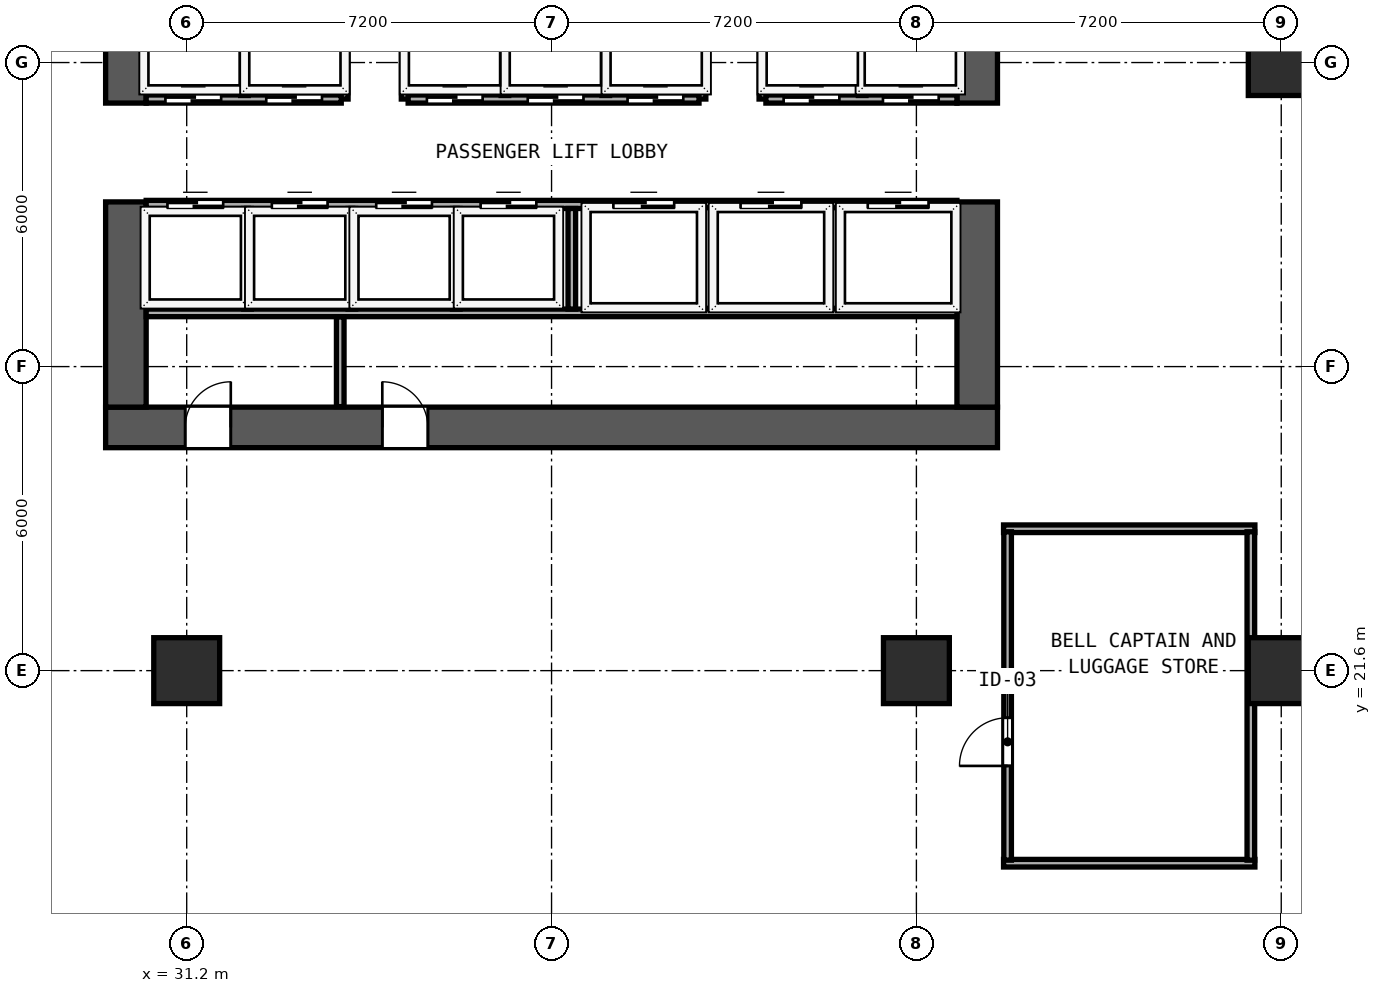
"""IFC4 building model, lengths in metres.
Left out: names, types, materials, properties, quantities, classifications, styles, units other than length and angle.
Written with IfcOpenShell. Run it as: python <this file> out.ifc"""

import sys

from ifc_helpers import new_model, si_unit, direction, frame, frame_2d, origin, origin_2d, place, context, subcontext, project, spatial, rectangle, hollow_rectangle, extrude, element, fill, save


model = new_model("IFC4")
c1 = context("Model", 3, precision=1e-05, world=origin(), true_north=direction((0.0, 1.0)))
c2 = subcontext(c1, "Body", "Model", "MODEL_VIEW")
j1 = project(units=[si_unit("LENGTHUNIT", "METRE"), si_unit("PLANEANGLEUNIT", "RADIAN")], contexts=[c1])
p1 = place(None, origin())
s1 = spatial("IfcSite", under=j1, at=p1, CompositionType="ELEMENT")
p2 = place(p1, origin())
s2 = spatial("IfcBuilding", under=s1, at=p2, CompositionType="ELEMENT")
p3 = place(p2, origin())
s3 = spatial("IfcBuildingStorey", under=s2, at=p3, CompositionType="ELEMENT", Elevation=0.0)
p4 = place(p3, frame((29.6, 26.4, 0.0), z_axis=(0.0, 0.0, 1.0), x_axis=(1.0, 0.0, 0.0)))
e1 = element("IfcWall", 1, at=p4, inside=s3, PredefinedType="SHEAR", context=c2, shape_type="SweptSolid", body=[
    extrude(rectangle(XDim=17.6, YDim=0.8, at=frame_2d((8.8, 0.0))), origin(), (0.0, 0.0, 1.0), 5.16),
])
p5 = place(p4, frame((2.47, 0.0, 0.0), z_axis=(0.0, 0.0, 1.0), x_axis=(-1.0, 0.0, 0.0)))
e2 = element("IfcOpeningElement", 2, at=p5, cuts=e1, PredefinedType="OPENING", context=c2, shape_type="SweptSolid", body=[
    extrude(rectangle(XDim=0.9, YDim=2.1, at=frame_2d((0.45, 1.05))), frame((0.0, 0.41, 0.0), z_axis=(0.0, -1.0, 0.0), x_axis=(1.0, 0.0, 0.0)), (0.0, 0.0, 1.0), 0.82),
])
p6 = place(p4, frame((6.36, 0.0, 0.0), z_axis=(0.0, 0.0, 1.0), x_axis=(-1.0, 0.0, 0.0)))
e3 = element("IfcOpeningElement", 3, at=p6, cuts=e1, PredefinedType="OPENING", context=c2, shape_type="SweptSolid", body=[
    extrude(rectangle(XDim=0.9, YDim=2.1, at=frame_2d((0.45, 1.05))), frame((0.0, 0.41, 0.0), z_axis=(0.0, -1.0, 0.0), x_axis=(1.0, 0.0, 0.0)), (0.0, 0.0, 1.0), 0.82),
])
p7 = place(p3, frame((30.0, 26.8, 0.0), z_axis=(0.0, 0.0, 1.0), x_axis=(0.0, 1.0, 0.0)))
e4 = element("IfcWall", 4, at=p7, inside=s3, PredefinedType="SHEAR", context=c2, shape_type="SweptSolid", body=[
    extrude(rectangle(XDim=4.05, YDim=0.8, at=frame_2d((2.025, 0.0))), origin(), (0.0, 0.0, 1.0), 5.16),
])
p8 = place(p3, frame((30.0, 32.8, 0.0), z_axis=(0.0, 0.0, 1.0), x_axis=(0.0, 1.0, 0.0)))
e5 = element("IfcWall", 5, at=p8, inside=s3, PredefinedType="SHEAR", context=c2, shape_type="SweptSolid", body=[
    extrude(rectangle(XDim=10.0, YDim=0.8, at=frame_2d((5.0, 0.0))), origin(), (0.0, 0.0, 1.0), 5.16),
])
p9 = place(p3, frame((46.8, 26.8, 0.0), z_axis=(0.0, 0.0, 1.0), x_axis=(0.0, 1.0, 0.0)))
e6 = element("IfcWall", 6, at=p9, inside=s3, PredefinedType="SHEAR", context=c2, shape_type="SweptSolid", body=[
    extrude(rectangle(XDim=4.05, YDim=0.8, at=frame_2d((2.025, 0.0))), origin(), (0.0, 0.0, 1.0), 5.16),
])
p10 = place(p3, frame((46.8, 32.8, 0.0), z_axis=(0.0, 0.0, 1.0), x_axis=(0.0, 1.0, 0.0)))
e7 = element("IfcWall", 7, at=p10, inside=s3, PredefinedType="SHEAR", context=c2, shape_type="SweptSolid", body=[
    extrude(rectangle(XDim=10.0, YDim=0.8, at=frame_2d((5.0, 0.0))), origin(), (0.0, 0.0, 1.0), 5.16),
])
for number, where, z_axis, x_axis in (
    (8, (52.8, 21.6, 0.0), (0.0, 0.0, 1.0), (1.0, 0.0, 0.0)),
    (9, (52.8, 33.6, 0.0), (0.0, 0.0, 1.0), (1.0, 0.0, 0.0)),
    (10, (31.2, 21.6, 0.0), (0.0, 0.0, 1.0), (1.0, 0.0, 0.0)),
    (11, (45.6, 21.6, 0.0), (0.0, 0.0, 1.0), (1.0, 0.0, 0.0)),
):
    element("IfcColumn", number, at=place(p3, frame(where, z_axis=z_axis, x_axis=x_axis)), inside=s3, PredefinedType="COLUMN", context=c2, shape_type="SweptSolid", body=[
        extrude(hollow_rectangle(XDim=1.3, YDim=1.3, WallThickness=0.048, at=origin_2d()), origin(), (0.0, 0.0, 1.0), 5.4),
    ])
for number, where, z_axis, x_axis in (
    (12, (34.31, 32.88, 0.0), (0.0, 0.0, 1.0), (0.0, 1.0, 0.0)),
    (13, (35.51, 32.88, 0.0), (0.0, 0.0, 1.0), (0.0, 1.0, 0.0)),
    (14, (41.37, 32.88, 0.0), (0.0, 0.0, 1.0), (0.0, 1.0, 0.0)),
    (15, (42.57, 32.88, 0.0), (0.0, 0.0, 1.0), (0.0, 1.0, 0.0)),
):
    element("IfcWall", number, at=place(p3, frame(where, z_axis=z_axis, x_axis=x_axis)), inside=s3, PredefinedType="SOLIDWALL", context=c2, shape_type="SweptSolid", body=[
        extrude(rectangle(XDim=2.17, YDim=0.15, at=frame_2d((1.085, 0.0))), origin(), (0.0, 0.0, 1.0), 5.16),
    ])
p11 = place(p3, frame((30.4, 32.88, 0.0), z_axis=(0.0, 0.0, 1.0), x_axis=(1.0, 0.0, 0.0)))
e16 = element("IfcWall", 16, at=p11, inside=s3, PredefinedType="SOLIDWALL", context=c2, shape_type="SweptSolid", body=[
    extrude(rectangle(XDim=3.85, YDim=0.16, at=frame_2d((1.925, 0.0))), origin(), (0.0, 0.0, 1.0), 5.16),
])
p12 = place(p11, frame((1.48, 0.0, 0.0), z_axis=(0.0, 0.0, 1.0), x_axis=(-1.0, 0.0, 0.0)))
e17 = element("IfcOpeningElement", 17, at=p12, cuts=e16, PredefinedType="OPENING", context=c2, shape_type="SweptSolid", body=[
    extrude(rectangle(XDim=1.1, YDim=2.2, at=frame_2d((0.55, 1.1))), frame((0.0, 0.09, 0.0), z_axis=(0.0, -1.0, 0.0), x_axis=(1.0, 0.0, 0.0)), (0.0, 0.0, 1.0), 0.18),
])
p13 = place(p11, frame((3.47, 0.0, 0.0), z_axis=(0.0, 0.0, 1.0), x_axis=(-1.0, 0.0, 0.0)))
e18 = element("IfcOpeningElement", 18, at=p13, cuts=e16, PredefinedType="OPENING", context=c2, shape_type="SweptSolid", body=[
    extrude(rectangle(XDim=1.1, YDim=2.2, at=frame_2d((0.55, 1.1))), frame((0.0, 0.09, 0.0), z_axis=(0.0, -1.0, 0.0), x_axis=(1.0, 0.0, 0.0)), (0.0, 0.0, 1.0), 0.18),
])
p14 = place(p3, frame((35.57, 32.88, 0.0), z_axis=(0.0, 0.0, 1.0), x_axis=(1.0, 0.0, 0.0)))
e19 = element("IfcWall", 19, at=p14, inside=s3, PredefinedType="SOLIDWALL", context=c2, shape_type="SweptSolid", body=[
    extrude(rectangle(XDim=5.74, YDim=0.16, at=frame_2d((2.87, 0.0))), origin(), (0.0, 0.0, 1.0), 5.16),
])
p15 = place(p14, frame((1.47, 0.0, 0.0), z_axis=(0.0, 0.0, 1.0), x_axis=(-1.0, 0.0, 0.0)))
e20 = element("IfcOpeningElement", 20, at=p15, cuts=e19, PredefinedType="OPENING", context=c2, shape_type="SweptSolid", body=[
    extrude(rectangle(XDim=1.1, YDim=2.2, at=frame_2d((0.55, 1.1))), frame((0.0, 0.09, 0.0), z_axis=(0.0, -1.0, 0.0), x_axis=(1.0, 0.0, 0.0)), (0.0, 0.0, 1.0), 0.18),
])
p16 = place(p14, frame((3.46, 0.0, 0.0), z_axis=(0.0, 0.0, 1.0), x_axis=(-1.0, 0.0, 0.0)))
e21 = element("IfcOpeningElement", 21, at=p16, cuts=e19, PredefinedType="OPENING", context=c2, shape_type="SweptSolid", body=[
    extrude(rectangle(XDim=1.1, YDim=2.2, at=frame_2d((0.55, 1.1))), frame((0.0, 0.09, 0.0), z_axis=(0.0, -1.0, 0.0), x_axis=(1.0, 0.0, 0.0)), (0.0, 0.0, 1.0), 0.18),
])
p17 = place(p14, frame((5.43, 0.0, 0.0), z_axis=(0.0, 0.0, 1.0), x_axis=(-1.0, 0.0, 0.0)))
e22 = element("IfcOpeningElement", 22, at=p17, cuts=e19, PredefinedType="OPENING", context=c2, shape_type="SweptSolid", body=[
    extrude(rectangle(XDim=1.1, YDim=2.2, at=frame_2d((0.55, 1.1))), frame((0.0, 0.09, 0.0), z_axis=(0.0, -1.0, 0.0), x_axis=(1.0, 0.0, 0.0)), (0.0, 0.0, 1.0), 0.18),
])
p18 = place(p3, frame((42.63, 32.88, 0.0), z_axis=(0.0, 0.0, 1.0), x_axis=(1.0, 0.0, 0.0)))
e23 = element("IfcWall", 23, at=p18, inside=s3, PredefinedType="SOLIDWALL", context=c2, shape_type="SweptSolid", body=[
    extrude(rectangle(XDim=3.77, YDim=0.16, at=frame_2d((1.885, 0.0))), origin(), (0.0, 0.0, 1.0), 5.16),
])
p19 = place(p18, frame((1.45, 0.0, 0.0), z_axis=(0.0, 0.0, 1.0), x_axis=(-1.0, 0.0, 0.0)))
e24 = element("IfcOpeningElement", 24, at=p19, cuts=e23, PredefinedType="OPENING", context=c2, shape_type="SweptSolid", body=[
    extrude(rectangle(XDim=1.1, YDim=2.2, at=frame_2d((0.55, 1.1))), frame((0.0, 0.09, 0.0), z_axis=(0.0, -1.0, 0.0), x_axis=(1.0, 0.0, 0.0)), (0.0, 0.0, 1.0), 0.18),
])
p20 = place(p18, frame((3.41, 0.0, 0.0), z_axis=(0.0, 0.0, 1.0), x_axis=(-1.0, 0.0, 0.0)))
e25 = element("IfcOpeningElement", 25, at=p20, cuts=e23, PredefinedType="OPENING", context=c2, shape_type="SweptSolid", body=[
    extrude(rectangle(XDim=1.1, YDim=2.2, at=frame_2d((0.55, 1.1))), frame((0.0, 0.09, 0.0), z_axis=(0.0, -1.0, 0.0), x_axis=(1.0, 0.0, 0.0)), (0.0, 0.0, 1.0), 0.18),
])
for number, where, z_axis, x_axis in (
    (26, (32.34, 32.95, 0.0), (0.0, 0.0, 1.0), (0.0, 1.0, 0.0)),
    (27, (37.48, 32.95, 0.0), (0.0, 0.0, 1.0), (0.0, 1.0, 0.0)),
    (28, (39.47, 32.95, 0.0), (0.0, 0.0, 1.0), (0.0, 1.0, 0.0)),
    (29, (44.53, 32.95, 0.0), (0.0, 0.0, 1.0), (0.0, 1.0, 0.0)),
):
    element("IfcWall", number, at=place(p3, frame(where, z_axis=z_axis, x_axis=x_axis)), inside=s3, PredefinedType="SOLIDWALL", context=c2, shape_type="SweptSolid", body=[
        extrude(rectangle(XDim=2.05, YDim=0.15, at=frame_2d((1.025, 0.0))), origin(), (0.0, 0.0, 1.0), 5.16),
    ])
p21 = place(p3, frame((30.4, 30.8, 0.0), z_axis=(0.0, 0.0, 1.0), x_axis=(1.0, 0.0, 0.0)))
e30 = element("IfcWall", 30, at=p21, inside=s3, PredefinedType="SOLIDWALL", context=c2, shape_type="SweptSolid", body=[
    extrude(rectangle(XDim=16.0, YDim=0.16, at=frame_2d((8.0, 0.0))), origin(), (0.0, 0.0, 1.0), 5.16),
])
p22 = place(p21, frame((0.42, 0.0, 0.0)))
e31 = element("IfcOpeningElement", 31, at=p22, cuts=e30, PredefinedType="OPENING", context=c2, shape_type="SweptSolid", body=[
    extrude(rectangle(XDim=1.1, YDim=2.2, at=frame_2d((0.55, 1.1))), frame((0.0, 0.09, 0.0), z_axis=(0.0, -1.0, 0.0), x_axis=(1.0, 0.0, 0.0)), (0.0, 0.0, 1.0), 0.18),
])
p23 = place(p21, frame((2.48, 0.0, 0.0)))
e32 = element("IfcOpeningElement", 32, at=p23, cuts=e30, PredefinedType="OPENING", context=c2, shape_type="SweptSolid", body=[
    extrude(rectangle(XDim=1.1, YDim=2.2, at=frame_2d((0.55, 1.1))), frame((0.0, 0.09, 0.0), z_axis=(0.0, -1.0, 0.0), x_axis=(1.0, 0.0, 0.0)), (0.0, 0.0, 1.0), 0.18),
])
p24 = place(p21, frame((4.54, 0.0, 0.0)))
e33 = element("IfcOpeningElement", 33, at=p24, cuts=e30, PredefinedType="OPENING", context=c2, shape_type="SweptSolid", body=[
    extrude(rectangle(XDim=1.1, YDim=2.2, at=frame_2d((0.55, 1.1))), frame((0.0, 0.09, 0.0), z_axis=(0.0, -1.0, 0.0), x_axis=(1.0, 0.0, 0.0)), (0.0, 0.0, 1.0), 0.18),
])
p25 = place(p21, frame((6.6, 0.0, 0.0)))
e34 = element("IfcOpeningElement", 34, at=p25, cuts=e30, PredefinedType="OPENING", context=c2, shape_type="SweptSolid", body=[
    extrude(rectangle(XDim=1.1, YDim=2.2, at=frame_2d((0.55, 1.1))), frame((0.0, 0.09, 0.0), z_axis=(0.0, -1.0, 0.0), x_axis=(1.0, 0.0, 0.0)), (0.0, 0.0, 1.0), 0.18),
])
p26 = place(p21, frame((9.22, 0.0, 0.0)))
e35 = element("IfcOpeningElement", 35, at=p26, cuts=e30, PredefinedType="OPENING", context=c2, shape_type="SweptSolid", body=[
    extrude(rectangle(XDim=1.2, YDim=2.2, at=frame_2d((0.6, 1.1))), frame((0.0, 0.09, 0.0), z_axis=(0.0, -1.0, 0.0), x_axis=(1.0, 0.0, 0.0)), (0.0, 0.0, 1.0), 0.18),
])
p27 = place(p21, frame((11.73, 0.0, 0.0)))
e36 = element("IfcOpeningElement", 36, at=p27, cuts=e30, PredefinedType="OPENING", context=c2, shape_type="SweptSolid", body=[
    extrude(rectangle(XDim=1.2, YDim=2.2, at=frame_2d((0.6, 1.1))), frame((0.0, 0.09, 0.0), z_axis=(0.0, -1.0, 0.0), x_axis=(1.0, 0.0, 0.0)), (0.0, 0.0, 1.0), 0.18),
])
p28 = place(p21, frame((14.24, 0.0, 0.0)))
e37 = element("IfcOpeningElement", 37, at=p28, cuts=e30, PredefinedType="OPENING", context=c2, shape_type="SweptSolid", body=[
    extrude(rectangle(XDim=1.2, YDim=2.2, at=frame_2d((0.6, 1.1))), frame((0.0, 0.09, 0.0), z_axis=(0.0, -1.0, 0.0), x_axis=(1.0, 0.0, 0.0)), (0.0, 0.0, 1.0), 0.18),
])
p29 = place(p3, frame((30.4, 28.66, 0.0), z_axis=(0.0, 0.0, 1.0), x_axis=(1.0, 0.0, 0.0)))
e38 = element("IfcWall", 38, at=p29, inside=s3, PredefinedType="PARTITIONING", context=c2, shape_type="SweptSolid", body=[
    extrude(rectangle(XDim=16.0, YDim=0.15, at=frame_2d((8.0, 0.0))), origin(), (0.0, 0.0, 1.0), 5.16),
])
for number, where, z_axis, x_axis in (
    (39, (32.4, 28.735, 0.0), (0.0, 0.0, 1.0), (0.0, 1.0, 0.0)),
    (40, (34.46, 28.735, 0.0), (0.0, 0.0, 1.0), (0.0, 1.0, 0.0)),
    (41, (36.52, 28.735, 0.0), (0.0, 0.0, 1.0), (0.0, 1.0, 0.0)),
    (42, (38.8, 28.735, 0.0), (0.0, 0.0, 1.0), (0.0, 1.0, 0.0)),
):
    element("IfcWall", number, at=place(p3, frame(where, z_axis=z_axis, x_axis=x_axis)), inside=s3, PredefinedType="SOLIDWALL", context=c2, shape_type="SweptSolid", body=[
        extrude(rectangle(XDim=1.985, YDim=0.15, at=frame_2d((0.992, 0.0))), origin(), (0.0, 0.0, 1.0), 5.16),
    ])
p30 = place(p3, frame((34.23, 26.81, 0.0), z_axis=(0.0, 0.0, 1.0), x_axis=(0.0, 1.0, 0.0)))
e43 = element("IfcWall", 43, at=p30, inside=s3, PredefinedType="PARTITIONING", context=c2, shape_type="SweptSolid", body=[
    extrude(rectangle(XDim=1.77, YDim=0.15, at=frame_2d((0.885, 0.0))), origin(), (0.0, 0.0, 1.0), 5.16),
])
for number, where, z_axis, x_axis in (
    (44, (41.47, 28.75, 0.0), (0.0, 0.0, 1.0), (0.0, 1.0, 0.0)),
    (45, (43.98, 28.75, 0.0), (0.0, 0.0, 1.0), (0.0, 1.0, 0.0)),
):
    element("IfcWall", number, at=place(p3, frame(where, z_axis=z_axis, x_axis=x_axis)), inside=s3, PredefinedType="SOLIDWALL", context=c2, shape_type="SweptSolid", body=[
        extrude(rectangle(XDim=1.985, YDim=0.15, at=frame_2d((0.993, 0.0))), origin(), (0.0, 0.0, 1.0), 5.16),
    ])
for number, where, z_axis, x_axis in (
    (46, (47.32, 24.4, 0.0), (0.0, 0.0, 1.0), (1.0, 0.0, 0.0)),
    (47, (47.32, 17.8, 0.0), (0.0, 0.0, 1.0), (1.0, 0.0, 0.0)),
):
    element("IfcWall", number, at=place(p3, frame(where, z_axis=z_axis, x_axis=x_axis)), inside=s3, PredefinedType="PARTITIONING", context=c2, shape_type="SweptSolid", body=[
        extrude(rectangle(XDim=4.96, YDim=0.15, at=frame_2d((2.48, 0.0))), origin(), (0.0, 0.0, 1.0), 5.16),
    ])
p31 = place(p3, frame((47.4, 17.86, 0.0), z_axis=(0.0, 0.0, 1.0), x_axis=(0.0, 1.0, 0.0)))
e48 = element("IfcWall", 48, at=p31, inside=s3, PredefinedType="PARTITIONING", context=c2, shape_type="SweptSolid", body=[
    extrude(rectangle(XDim=6.48, YDim=0.15, at=frame_2d((3.24, 0.0))), origin(), (0.0, 0.0, 1.0), 5.16),
])
p32 = place(p31, frame((1.86, 0.0, 0.0)))
e49 = element("IfcOpeningElement", 49, at=p32, cuts=e48, PredefinedType="OPENING", context=c2, shape_type="SweptSolid", body=[
    extrude(rectangle(XDim=0.95, YDim=2.12, at=frame_2d((0.475, 1.06))), frame((0.0, 0.085, 0.0), z_axis=(0.0, -1.0, 0.0), x_axis=(1.0, 0.0, 0.0)), (0.0, 0.0, 1.0), 0.17),
])
p33 = place(p3, frame((52.2, 17.86, 0.0), z_axis=(0.0, 0.0, 1.0), x_axis=(0.0, 1.0, 0.0)))
e50 = element("IfcWall", 50, at=p33, inside=s3, PredefinedType="PARTITIONING", context=c2, shape_type="SweptSolid", body=[
    extrude(rectangle(XDim=6.48, YDim=0.15, at=frame_2d((3.24, 0.0))), origin(), (0.0, 0.0, 1.0), 5.16),
])
p34 = place(p12, origin())
e51 = element("IfcDoor", 51, at=p34, inside=s3, OperationType="SLIDING_TO_LEFT", PredefinedType="DOOR", context=c2, shape_type="SweptSolid", body=[
    extrude(rectangle(XDim=1.1, YDim=2.2, at=frame_2d((0.55, 1.1))), frame((0.0, 0.025, 0.0), z_axis=(0.0, -1.0, 0.0), x_axis=(1.0, 0.0, 0.0)), (0.0, 0.0, 1.0), 0.05),
])
fill(e17, e51)
p35 = place(p13, origin())
e52 = element("IfcDoor", 52, at=p35, inside=s3, OperationType="SLIDING_TO_LEFT", PredefinedType="DOOR", context=c2, shape_type="SweptSolid", body=[
    extrude(rectangle(XDim=1.1, YDim=2.2, at=frame_2d((0.55, 1.1))), frame((0.0, 0.025, 0.0), z_axis=(0.0, -1.0, 0.0), x_axis=(1.0, 0.0, 0.0)), (0.0, 0.0, 1.0), 0.05),
])
fill(e18, e52)
p36 = place(p15, origin())
e53 = element("IfcDoor", 53, at=p36, inside=s3, OperationType="SLIDING_TO_LEFT", PredefinedType="DOOR", context=c2, shape_type="SweptSolid", body=[
    extrude(rectangle(XDim=1.1, YDim=2.2, at=frame_2d((0.55, 1.1))), frame((0.0, 0.025, 0.0), z_axis=(0.0, -1.0, 0.0), x_axis=(1.0, 0.0, 0.0)), (0.0, 0.0, 1.0), 0.05),
])
fill(e20, e53)
p37 = place(p16, origin())
e54 = element("IfcDoor", 54, at=p37, inside=s3, OperationType="SLIDING_TO_LEFT", PredefinedType="DOOR", context=c2, shape_type="SweptSolid", body=[
    extrude(rectangle(XDim=1.1, YDim=2.2, at=frame_2d((0.55, 1.1))), frame((0.0, 0.025, 0.0), z_axis=(0.0, -1.0, 0.0), x_axis=(1.0, 0.0, 0.0)), (0.0, 0.0, 1.0), 0.05),
])
fill(e21, e54)
p38 = place(p17, origin())
e55 = element("IfcDoor", 55, at=p38, inside=s3, OperationType="SLIDING_TO_RIGHT", PredefinedType="DOOR", context=c2, shape_type="SweptSolid", body=[
    extrude(rectangle(XDim=1.1, YDim=2.2, at=frame_2d((0.55, 1.1))), frame((0.0, 0.025, 0.0), z_axis=(0.0, -1.0, 0.0), x_axis=(1.0, 0.0, 0.0)), (0.0, 0.0, 1.0), 0.05),
])
fill(e22, e55)
p39 = place(p19, origin())
e56 = element("IfcDoor", 56, at=p39, inside=s3, OperationType="SLIDING_TO_RIGHT", PredefinedType="DOOR", context=c2, shape_type="SweptSolid", body=[
    extrude(rectangle(XDim=1.1, YDim=2.2, at=frame_2d((0.55, 1.1))), frame((0.0, 0.025, 0.0), z_axis=(0.0, -1.0, 0.0), x_axis=(1.0, 0.0, 0.0)), (0.0, 0.0, 1.0), 0.05),
])
fill(e24, e56)
p40 = place(p20, origin())
e57 = element("IfcDoor", 57, at=p40, inside=s3, OperationType="SLIDING_TO_RIGHT", PredefinedType="DOOR", context=c2, shape_type="SweptSolid", body=[
    extrude(rectangle(XDim=1.1, YDim=2.2, at=frame_2d((0.55, 1.1))), frame((0.0, 0.025, 0.0), z_axis=(0.0, -1.0, 0.0), x_axis=(1.0, 0.0, 0.0)), (0.0, 0.0, 1.0), 0.05),
])
fill(e25, e57)
p41 = place(p22, origin())
e58 = element("IfcDoor", 58, at=p41, inside=s3, OperationType="SLIDING_TO_LEFT", PredefinedType="DOOR", context=c2, shape_type="SweptSolid", body=[
    extrude(rectangle(XDim=1.1, YDim=2.2, at=frame_2d((0.55, 1.1))), frame((0.0, 0.025, 0.0), z_axis=(0.0, -1.0, 0.0), x_axis=(1.0, 0.0, 0.0)), (0.0, 0.0, 1.0), 0.05),
])
fill(e31, e58)
p42 = place(p23, origin())
e59 = element("IfcDoor", 59, at=p42, inside=s3, OperationType="SLIDING_TO_LEFT", PredefinedType="DOOR", context=c2, shape_type="SweptSolid", body=[
    extrude(rectangle(XDim=1.1, YDim=2.2, at=frame_2d((0.55, 1.1))), frame((0.0, 0.025, 0.0), z_axis=(0.0, -1.0, 0.0), x_axis=(1.0, 0.0, 0.0)), (0.0, 0.0, 1.0), 0.05),
])
fill(e32, e59)
p43 = place(p24, origin())
e60 = element("IfcDoor", 60, at=p43, inside=s3, OperationType="SLIDING_TO_LEFT", PredefinedType="DOOR", context=c2, shape_type="SweptSolid", body=[
    extrude(rectangle(XDim=1.1, YDim=2.2, at=frame_2d((0.55, 1.1))), frame((0.0, 0.025, 0.0), z_axis=(0.0, -1.0, 0.0), x_axis=(1.0, 0.0, 0.0)), (0.0, 0.0, 1.0), 0.05),
])
fill(e33, e60)
p44 = place(p25, origin())
e61 = element("IfcDoor", 61, at=p44, inside=s3, OperationType="SLIDING_TO_LEFT", PredefinedType="DOOR", context=c2, shape_type="SweptSolid", body=[
    extrude(rectangle(XDim=1.1, YDim=2.2, at=frame_2d((0.55, 1.1))), frame((0.0, 0.025, 0.0), z_axis=(0.0, -1.0, 0.0), x_axis=(1.0, 0.0, 0.0)), (0.0, 0.0, 1.0), 0.05),
])
fill(e34, e61)
p45 = place(p5, origin())
e62 = element("IfcDoor", 62, at=p45, inside=s3, OperationType="SINGLE_SWING_LEFT", PredefinedType="DOOR", context=c2, shape_type="SweptSolid", body=[
    extrude(rectangle(XDim=0.9, YDim=2.1, at=frame_2d((0.45, 1.05))), frame((0.0, -0.195, 0.0), z_axis=(0.0, -1.0, 0.0), x_axis=(1.0, 0.0, 0.0)), (0.0, 0.0, 1.0), 0.05),
])
fill(e2, e62)
p46 = place(p6, origin())
e63 = element("IfcDoor", 63, at=p46, inside=s3, OperationType="SINGLE_SWING_RIGHT", PredefinedType="DOOR", context=c2, shape_type="SweptSolid", body=[
    extrude(rectangle(XDim=0.9, YDim=2.1, at=frame_2d((0.45, 1.05))), frame((0.0, -0.195, 0.0), z_axis=(0.0, -1.0, 0.0), x_axis=(1.0, 0.0, 0.0)), (0.0, 0.0, 1.0), 0.05),
])
fill(e3, e63)
p47 = place(p26, origin())
e64 = element("IfcDoor", 64, at=p47, inside=s3, OperationType="SLIDING_TO_RIGHT", PredefinedType="DOOR", context=c2, shape_type="SweptSolid", body=[
    extrude(rectangle(XDim=1.2, YDim=2.2, at=frame_2d((0.6, 1.1))), frame((0.0, 0.025, 0.0), z_axis=(0.0, -1.0, 0.0), x_axis=(1.0, 0.0, 0.0)), (0.0, 0.0, 1.0), 0.05),
])
fill(e35, e64)
p48 = place(p27, origin())
e65 = element("IfcDoor", 65, at=p48, inside=s3, OperationType="SLIDING_TO_RIGHT", PredefinedType="DOOR", context=c2, shape_type="SweptSolid", body=[
    extrude(rectangle(XDim=1.2, YDim=2.2, at=frame_2d((0.6, 1.1))), frame((0.0, 0.025, 0.0), z_axis=(0.0, -1.0, 0.0), x_axis=(1.0, 0.0, 0.0)), (0.0, 0.0, 1.0), 0.05),
])
fill(e36, e65)
p49 = place(p28, origin())
e66 = element("IfcDoor", 66, at=p49, inside=s3, OperationType="SLIDING_TO_RIGHT", PredefinedType="DOOR", context=c2, shape_type="SweptSolid", body=[
    extrude(rectangle(XDim=1.2, YDim=2.2, at=frame_2d((0.6, 1.1))), frame((0.0, 0.025, 0.0), z_axis=(0.0, -1.0, 0.0), x_axis=(1.0, 0.0, 0.0)), (0.0, 0.0, 1.0), 0.05),
])
fill(e37, e66)
p50 = place(p32, origin())
e67 = element("IfcDoor", 67, at=p50, inside=s3, OperationType="SINGLE_SWING_LEFT", PredefinedType="DOOR", context=c2, shape_type="SweptSolid", body=[
    extrude(rectangle(XDim=0.95, YDim=2.12, at=frame_2d((0.475, 1.06))), frame((0.0, 0.025, 0.0), z_axis=(0.0, -1.0, 0.0), x_axis=(1.0, 0.0, 0.0)), (0.0, 0.0, 1.0), 0.05),
])
fill(e49, e67)
save(model, sys.argv[1])
